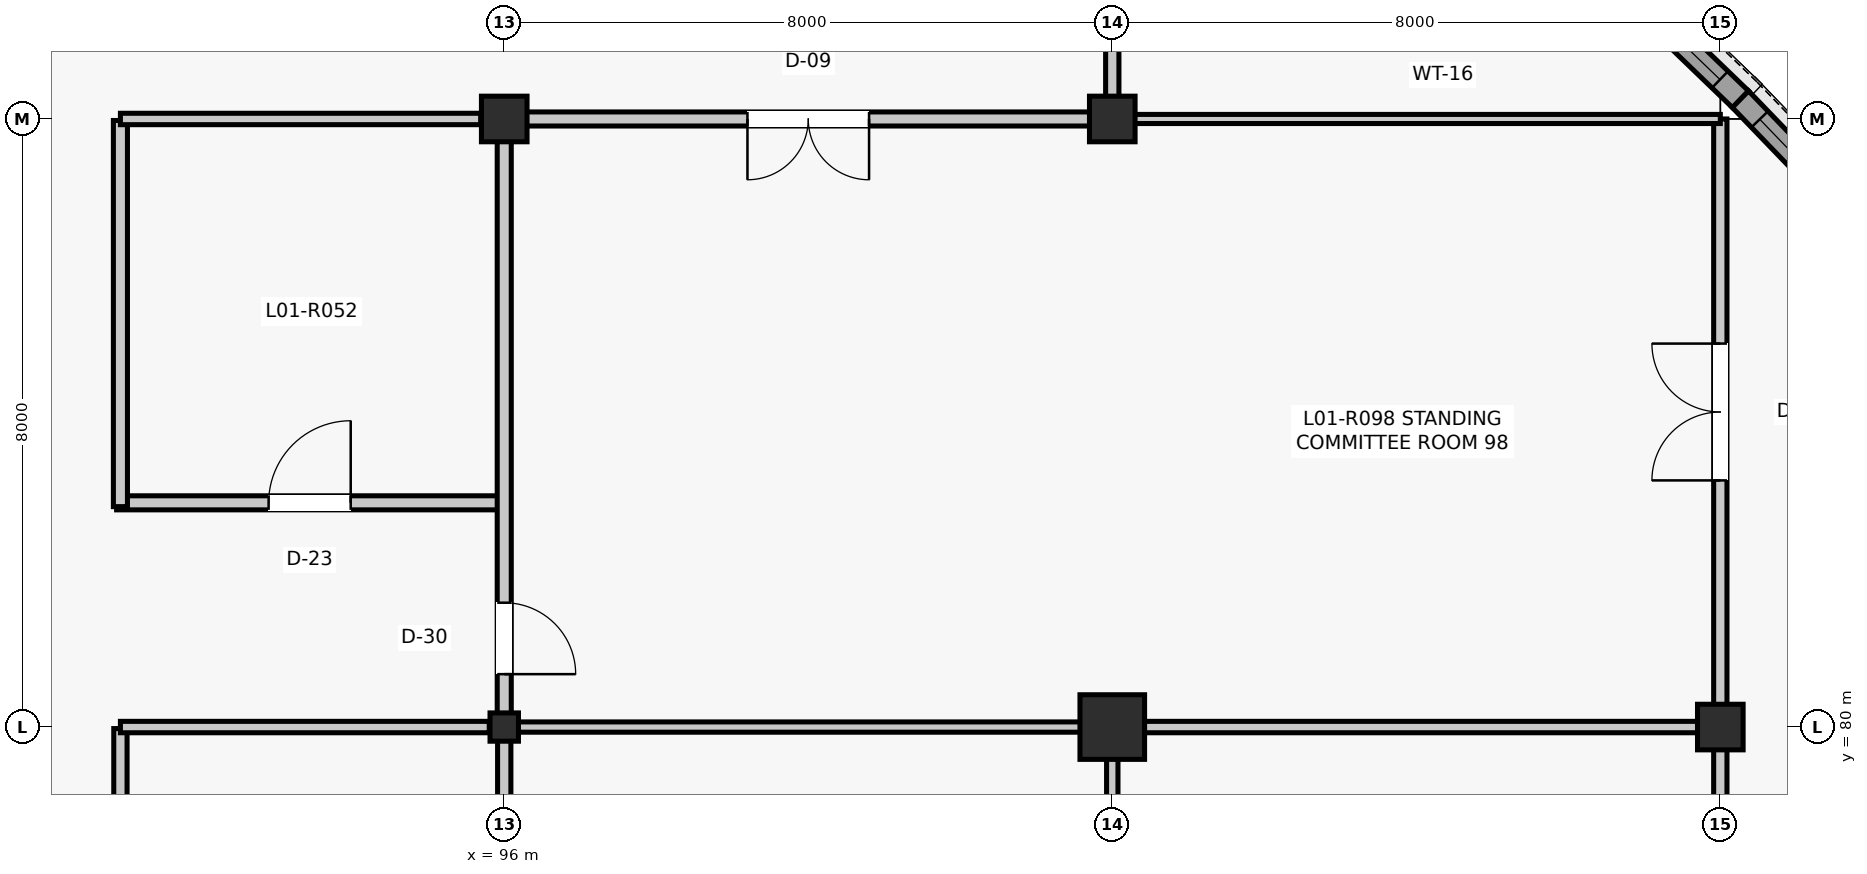
"""IFC4 building model, lengths in metres.
Left out: names, types, materials, properties, quantities, classifications, styles, units other than length and angle.
Written with IfcOpenShell. Run it as: python <this file> out.ifc"""

import sys

from ifc_helpers import new_model, si_unit, direction, frame, frame_2d, origin, origin_2d, place, context, subcontext, project, spatial, rectangle, i_section, extrude, element, fill, save


model = new_model("IFC4")
c1 = context("Model", 3, precision=1e-05, world=origin(), true_north=direction((0.0, 1.0)))
c2 = subcontext(c1, "Body", "Model", "MODEL_VIEW")
j1 = project(units=[si_unit("LENGTHUNIT", "METRE"), si_unit("PLANEANGLEUNIT", "RADIAN")], contexts=[c1])
p1 = place(None, origin())
s1 = spatial("IfcSite", under=j1, at=p1, CompositionType="ELEMENT")
p2 = place(p1, origin())
s2 = spatial("IfcBuilding", under=s1, at=p2, CompositionType="ELEMENT")
p3 = place(p2, frame((0.0, 0.0, 5.28)))
s3 = spatial("IfcBuildingStorey", under=s2, at=p3, CompositionType="ELEMENT", Elevation=5.28)
p4 = place(p3, frame((96.0, 80.0, 0.0), z_axis=(0.0, 0.0, 1.0), x_axis=(1.0, 0.0, 0.0)))
e1 = element("IfcColumn", 1, at=p4, inside=s3, PredefinedType="COLUMN", context=c2, shape_type="SweptSolid", body=[
    extrude(i_section(OverallWidth=0.374, OverallDepth=0.372, WebThickness=0.016, FlangeThickness=0.026, FilletRadius=0.015, at=origin_2d()), origin(), (0.0, 0.0, 1.0), 4.62),
])
p5 = place(p3, frame((96.0, 88.0, 0.0), z_axis=(0.0, 0.0, 1.0), x_axis=(1.0, 0.0, 0.0)))
e2 = element("IfcColumn", 2, at=p5, inside=s3, PredefinedType="COLUMN", context=c2, shape_type="SweptSolid", body=[
    extrude(rectangle(XDim=0.6, YDim=0.6, at=origin_2d()), origin(), (0.0, 0.0, 1.0), 4.62),
])
p6 = place(p3, frame((104.0, 80.0, 0.0), z_axis=(0.0, 0.0, 1.0), x_axis=(1.0, 0.0, 0.0)))
e3 = element("IfcColumn", 3, at=p6, inside=s3, PredefinedType="COLUMN", context=c2, shape_type="SweptSolid", body=[
    extrude(rectangle(XDim=0.85, YDim=0.85, at=origin_2d()), origin(), (0.0, 0.0, 1.0), 4.62),
])
for number, where, z_axis, x_axis in (
    (4, (104.0, 88.0, 0.0), (0.0, 0.0, 1.0), (1.0, 0.0, 0.0)),
    (5, (112.0, 80.0, 0.0), (0.0, 0.0, 1.0), (1.0, 0.0, 0.0)),
):
    element("IfcColumn", number, at=place(p3, frame(where, z_axis=z_axis, x_axis=x_axis)), inside=s3, PredefinedType="COLUMN", context=c2, shape_type="SweptSolid", body=[
        extrude(rectangle(XDim=0.6, YDim=0.6, at=origin_2d()), origin(), (0.0, 0.0, 1.0), 4.62),
    ])
p7 = place(p3, frame((113.506, 86.971, 0.0), z_axis=(0.0, 0.0, 1.0), x_axis=(-0.693722700342, 0.720242191926, 0.0)))
e6 = element("IfcWall", 6, at=p7, inside=s3, PredefinedType="SOLIDWALL", context=c2, shape_type="SweptSolid", body=[
    extrude(rectangle(XDim=1.795, YDim=0.305, at=frame_2d((0.897, 0.0))), origin(), (0.0, 0.0, 1.0), 4.335),
])
p8 = place(p7, frame((0.373, 0.0, 0.9)))
e7 = element("IfcOpeningElement", 7, at=p8, cuts=e6, PredefinedType="OPENING", context=c2, shape_type="SweptSolid", body=[
    extrude(rectangle(XDim=1.05, YDim=1.85, at=frame_2d((0.525, 0.925))), frame((0.0, 0.162, 0.0), z_axis=(0.0, -1.0, 0.0), x_axis=(1.0, 0.0, 0.0)), (0.0, 0.0, 1.0), 0.325),
])
p9 = place(p3, frame((112.264, 88.26, 0.0), z_axis=(0.0, 0.0, 1.0), x_axis=(-0.720242191926, 0.693722700342, 0.0)))
e8 = element("IfcWall", 8, at=p9, inside=s3, PredefinedType="SOLIDWALL", context=c2, shape_type="SweptSolid", body=[
    extrude(rectangle(XDim=1.795, YDim=0.305, at=frame_2d((0.897, 0.0))), origin(), (0.0, 0.0, 1.0), 4.335),
])
p10 = place(p9, frame((0.373, 0.0, 0.9)))
e9 = element("IfcOpeningElement", 9, at=p10, cuts=e8, PredefinedType="OPENING", context=c2, shape_type="SweptSolid", body=[
    extrude(rectangle(XDim=1.05, YDim=1.85, at=frame_2d((0.525, 0.925))), frame((0.0, 0.162, 0.0), z_axis=(0.0, -1.0, 0.0), x_axis=(1.0, 0.0, 0.0)), (0.0, 0.0, 1.0), 0.325),
])
p11 = place(p3, frame((90.95, 74.9, 0.0), z_axis=(0.0, 0.0, 1.0), x_axis=(0.0, 1.0, 0.0)))
e10 = element("IfcWall", 10, at=p11, inside=s3, PredefinedType="PARTITIONING", context=c2, shape_type="SweptSolid", body=[
    extrude(rectangle(XDim=5.08, YDim=0.175, at=frame_2d((2.54, 0.0))), origin(), (0.0, 0.0, 1.0), 3.787),
])
p12 = place(p3, frame((90.95, 80.0, 0.0), z_axis=(0.0, 0.0, 1.0), x_axis=(1.0, 0.0, 0.0)))
e11 = element("IfcWall", 11, at=p12, inside=s3, PredefinedType="PARTITIONING", context=c2, shape_type="SweptSolid", body=[
    extrude(rectangle(XDim=4.853, YDim=0.15, at=frame_2d((2.427, 0.0))), origin(), (0.0, 0.0, 1.0), 3.787),
])
p13 = place(p3, frame((90.9, 82.95, 0.0), z_axis=(0.0, 0.0, 1.0), x_axis=(1.0, 0.0, 0.0)))
e12 = element("IfcWall", 12, at=p13, inside=s3, PredefinedType="PARTITIONING", context=c2, shape_type="SweptSolid", body=[
    extrude(rectangle(XDim=5.08, YDim=0.185, at=frame_2d((2.54, 0.0))), origin(), (0.0, 0.0, 1.0), 3.826),
])
p14 = place(p13, frame((2.0, 0.0, 0.0)))
e13 = element("IfcOpeningElement", 13, at=p14, cuts=e12, PredefinedType="OPENING", context=c2, shape_type="SweptSolid", body=[
    extrude(rectangle(XDim=1.08, YDim=2.2, at=frame_2d((0.54, 1.1))), frame((0.0, 0.103, 0.0), z_axis=(0.0, -1.0, 0.0), x_axis=(1.0, 0.0, 0.0)), (0.0, 0.0, 1.0), 0.205),
])
p15 = place(p3, frame((90.95, 82.9, 0.0), z_axis=(0.0, 0.0, 1.0), x_axis=(0.0, 1.0, 0.0)))
e14 = element("IfcWall", 14, at=p15, inside=s3, PredefinedType="PARTITIONING", context=c2, shape_type="SweptSolid", body=[
    extrude(rectangle(XDim=5.08, YDim=0.185, at=frame_2d((2.54, 0.0))), origin(), (0.0, 0.0, 1.0), 3.816),
])
p16 = place(p3, frame((90.95, 88.0, 0.0), z_axis=(0.0, 0.0, 1.0), x_axis=(1.0, 0.0, 0.0)))
e15 = element("IfcWall", 15, at=p16, inside=s3, PredefinedType="PARTITIONING", context=c2, shape_type="SweptSolid", body=[
    extrude(rectangle(XDim=4.74, YDim=0.15, at=frame_2d((2.37, 0.0))), origin(), (0.0, 0.0, 1.0), 3.816),
])
p17 = place(p3, frame((96.0, 72.176, 0.0), z_axis=(0.0, 0.0, 1.0), x_axis=(0.0, 1.0, 0.0)))
e16 = element("IfcWall", 16, at=p17, inside=s3, PredefinedType="PARTITIONING", context=c2, shape_type="SweptSolid", body=[
    extrude(rectangle(XDim=7.648, YDim=0.175, at=frame_2d((3.824, 0.0))), origin(), (0.0, 0.0, 1.0), 3.857),
])
p18 = place(p17, frame((0.52, 0.0, 0.0)))
e17 = element("IfcOpeningElement", 17, at=p18, cuts=e16, PredefinedType="OPENING", context=c2, shape_type="SweptSolid", body=[
    extrude(rectangle(XDim=0.94, YDim=2.12, at=frame_2d((0.47, 1.06))), frame((0.0, 0.097, 0.0), z_axis=(0.0, -1.0, 0.0), x_axis=(1.0, 0.0, 0.0)), (0.0, 0.0, 1.0), 0.195),
])
p19 = place(p3, frame((96.0, 80.176, 0.0), z_axis=(0.0, 0.0, 1.0), x_axis=(0.0, 1.0, 0.0)))
e18 = element("IfcWall", 18, at=p19, inside=s3, PredefinedType="PARTITIONING", context=c2, shape_type="SweptSolid", body=[
    extrude(rectangle(XDim=7.534, YDim=0.185, at=frame_2d((3.767, 0.0))), origin(), (0.0, 0.0, 1.0), 3.826),
])
p20 = place(p19, frame((0.52, 0.0, 0.0)))
e19 = element("IfcOpeningElement", 19, at=p20, cuts=e18, PredefinedType="OPENING", context=c2, shape_type="SweptSolid", body=[
    extrude(rectangle(XDim=0.94, YDim=2.12, at=frame_2d((0.47, 1.06))), frame((0.0, 0.103, 0.0), z_axis=(0.0, -1.0, 0.0), x_axis=(1.0, 0.0, 0.0)), (0.0, 0.0, 1.0), 0.205),
])
p21 = place(p3, frame((104.0, 72.415, 0.0), z_axis=(0.0, 0.0, 1.0), x_axis=(0.0, 1.0, 0.0)))
e20 = element("IfcWall", 20, at=p21, inside=s3, PredefinedType="PARTITIONING", context=c2, shape_type="SweptSolid", body=[
    extrude(rectangle(XDim=7.17, YDim=0.15, at=frame_2d((3.585, 0.0))), origin(), (0.0, 0.0, 1.0), 3.781),
])
p22 = place(p3, frame((96.177, 80.0, 0.0), z_axis=(0.0, 0.0, 1.0), x_axis=(1.0, 0.0, 0.0)))
e21 = element("IfcWall", 21, at=p22, inside=s3, PredefinedType="PARTITIONING", context=c2, shape_type="SweptSolid", body=[
    extrude(rectangle(XDim=7.408, YDim=0.135, at=frame_2d((3.704, 0.0))), origin(), (0.0, 0.0, 1.0), 3.771),
])
p23 = place(p3, frame((96.29, 88.0, 0.0), z_axis=(0.0, 0.0, 1.0), x_axis=(1.0, 0.0, 0.0)))
e22 = element("IfcWall", 22, at=p23, inside=s3, PredefinedType="PARTITIONING", context=c2, shape_type="SweptSolid", body=[
    extrude(rectangle(XDim=7.42, YDim=0.185, at=frame_2d((3.71, 0.0))), origin(), (0.0, 0.0, 1.0), 3.826),
])
p24 = place(p23, frame((2.91, 0.0, 0.0)))
e23 = element("IfcOpeningElement", 23, at=p24, cuts=e22, PredefinedType="OPENING", context=c2, shape_type="SweptSolid", body=[
    extrude(rectangle(XDim=1.6, YDim=2.25, at=frame_2d((0.8, 1.125))), frame((0.0, 0.103, 0.0), z_axis=(0.0, -1.0, 0.0), x_axis=(1.0, 0.0, 0.0)), (0.0, 0.0, 1.0), 0.205),
])
p25 = place(p3, frame((104.0, 88.29, 0.0), z_axis=(0.0, 0.0, 1.0), x_axis=(0.0, 1.0, 0.0)))
e24 = element("IfcWall", 24, at=p25, inside=s3, PredefinedType="PARTITIONING", context=c2, shape_type="SweptSolid", body=[
    extrude(rectangle(XDim=7.71, YDim=0.175, at=frame_2d((3.855, 0.0))), origin(), (0.0, 0.0, 1.0), 4.325),
])
p26 = place(p25, frame((3.395, 0.0, 0.0)))
e25 = element("IfcOpeningElement", 25, at=p26, cuts=e24, PredefinedType="OPENING", context=c2, shape_type="SweptSolid", body=[
    extrude(rectangle(XDim=0.92, YDim=2.1, at=frame_2d((0.46, 1.05))), frame((0.0, 0.097, 0.0), z_axis=(0.0, -1.0, 0.0), x_axis=(1.0, 0.0, 0.0)), (0.0, 0.0, 1.0), 0.195),
])
p27 = place(p3, frame((112.0, 72.29, 0.0), z_axis=(0.0, 0.0, 1.0), x_axis=(0.0, 1.0, 0.0)))
e26 = element("IfcWall", 26, at=p27, inside=s3, PredefinedType="PARTITIONING", context=c2, shape_type="SweptSolid", body=[
    extrude(rectangle(XDim=7.42, YDim=0.175, at=frame_2d((3.71, 0.0))), origin(), (0.0, 0.0, 1.0), 3.851),
])
p28 = place(p27, frame((1.355, 0.0, 0.0)))
e27 = element("IfcOpeningElement", 27, at=p28, cuts=e26, PredefinedType="OPENING", context=c2, shape_type="SweptSolid", body=[
    extrude(rectangle(XDim=1.0, YDim=2.15, at=frame_2d((0.5, 1.075))), frame((0.0, 0.097, 0.0), z_axis=(0.0, -1.0, 0.0), x_axis=(1.0, 0.0, 0.0)), (0.0, 0.0, 1.0), 0.195),
])
p29 = place(p27, frame((5.436, 0.0, 0.0)))
e28 = element("IfcOpeningElement", 28, at=p29, cuts=e26, PredefinedType="OPENING", context=c2, shape_type="SweptSolid", body=[
    extrude(rectangle(XDim=1.0, YDim=2.15, at=frame_2d((0.5, 1.075))), frame((0.0, 0.097, 0.0), z_axis=(0.0, -1.0, 0.0), x_axis=(1.0, 0.0, 0.0)), (0.0, 0.0, 1.0), 0.195),
])
p30 = place(p3, frame((104.415, 80.0, 0.0), z_axis=(0.0, 0.0, 1.0), x_axis=(1.0, 0.0, 0.0)))
e29 = element("IfcWall", 29, at=p30, inside=s3, PredefinedType="PARTITIONING", context=c2, shape_type="SweptSolid", body=[
    extrude(rectangle(XDim=7.295, YDim=0.15, at=frame_2d((3.647, 0.0))), origin(), (0.0, 0.0, 1.0), 3.781),
])
p31 = place(p3, frame((112.0, 80.29, 0.0), z_axis=(0.0, 0.0, 1.0), x_axis=(0.0, 1.0, 0.0)))
e30 = element("IfcWall", 30, at=p31, inside=s3, PredefinedType="PARTITIONING", context=c2, shape_type="SweptSolid", body=[
    extrude(rectangle(XDim=7.71, YDim=0.175, at=frame_2d((3.855, 0.0))), origin(), (0.0, 0.0, 1.0), 4.325),
])
p32 = place(p31, frame((2.955, 0.0, 0.0)))
e31 = element("IfcOpeningElement", 31, at=p32, cuts=e30, PredefinedType="OPENING", context=c2, shape_type="SweptSolid", body=[
    extrude(rectangle(XDim=1.8, YDim=2.35, at=frame_2d((0.9, 1.175))), frame((0.0, 0.097, 0.0), z_axis=(0.0, -1.0, 0.0), x_axis=(1.0, 0.0, 0.0)), (0.0, 0.0, 1.0), 0.195),
])
p33 = place(p3, frame((104.29, 88.0, 0.0), z_axis=(0.0, 0.0, 1.0), x_axis=(1.0, 0.0, 0.0)))
e32 = element("IfcWall", 32, at=p33, inside=s3, PredefinedType="PARTITIONING", context=c2, shape_type="SweptSolid", body=[
    extrude(rectangle(XDim=7.71, YDim=0.12, at=frame_2d((3.855, 0.0))), origin(), (0.0, 0.0, 1.0), 4.325),
])
p34 = place(p8, origin())
e33 = element("IfcWindow", 33, at=p34, inside=s3, PartitioningType="SINGLE_PANEL", PredefinedType="WINDOW", context=c2, shape_type="SweptSolid", body=[
    extrude(rectangle(XDim=1.05, YDim=1.85, at=frame_2d((0.525, 0.925))), frame((0.0, 0.03, 0.0), z_axis=(0.0, -1.0, 0.0), x_axis=(1.0, 0.0, 0.0)), (0.0, 0.0, 1.0), 0.06),
])
fill(e7, e33)
p35 = place(p10, origin())
e34 = element("IfcWindow", 34, at=p35, inside=s3, PartitioningType="SINGLE_PANEL", PredefinedType="WINDOW", context=c2, shape_type="SweptSolid", body=[
    extrude(rectangle(XDim=1.05, YDim=1.85, at=frame_2d((0.525, 0.925))), frame((0.0, 0.03, 0.0), z_axis=(0.0, -1.0, 0.0), x_axis=(1.0, 0.0, 0.0)), (0.0, 0.0, 1.0), 0.06),
])
fill(e9, e34)
p36 = place(p14, origin())
e35 = element("IfcDoor", 35, at=p36, inside=s3, OperationType="SINGLE_SWING_RIGHT", PredefinedType="DOOR", context=c2, shape_type="SweptSolid", body=[
    extrude(rectangle(XDim=1.08, YDim=2.2, at=frame_2d((0.54, 1.1))), frame((0.0, 0.025, 0.0), z_axis=(0.0, -1.0, 0.0), x_axis=(1.0, 0.0, 0.0)), (0.0, 0.0, 1.0), 0.05),
])
fill(e13, e35)
p37 = place(p20, frame((0.94, 0.0, 0.0), z_axis=(0.0, 0.0, 1.0), x_axis=(-1.0, 0.0, 0.0)))
e36 = element("IfcDoor", 36, at=p37, inside=s3, OperationType="SINGLE_SWING_LEFT", PredefinedType="DOOR", context=c2, shape_type="SweptSolid", body=[
    extrude(rectangle(XDim=0.94, YDim=2.12, at=frame_2d((0.47, 1.06))), frame((0.0, 0.025, 0.0), z_axis=(0.0, -1.0, 0.0), x_axis=(1.0, 0.0, 0.0)), (0.0, 0.0, 1.0), 0.05),
])
fill(e19, e36)
p38 = place(p24, frame((1.6, 0.0, 0.0), z_axis=(0.0, 0.0, 1.0), x_axis=(-1.0, 0.0, 0.0)))
e37 = element("IfcDoor", 37, at=p38, inside=s3, OperationType="DOUBLE_DOOR_SINGLE_SWING", PredefinedType="DOOR", context=c2, shape_type="SweptSolid", body=[
    extrude(rectangle(XDim=1.6, YDim=2.25, at=frame_2d((0.8, 1.125))), frame((0.0, 0.025, 0.0), z_axis=(0.0, -1.0, 0.0), x_axis=(1.0, 0.0, 0.0)), (0.0, 0.0, 1.0), 0.05),
])
fill(e23, e37)
p39 = place(p32, origin())
e38 = element("IfcDoor", 38, at=p39, inside=s3, OperationType="DOUBLE_DOOR_SINGLE_SWING", PredefinedType="DOOR", context=c2, shape_type="SweptSolid", body=[
    extrude(rectangle(XDim=1.8, YDim=2.35, at=frame_2d((0.9, 1.175))), frame((0.0, 0.025, 0.0), z_axis=(0.0, -1.0, 0.0), x_axis=(1.0, 0.0, 0.0)), (0.0, 0.0, 1.0), 0.05),
])
fill(e31, e38)
save(model, sys.argv[1])
